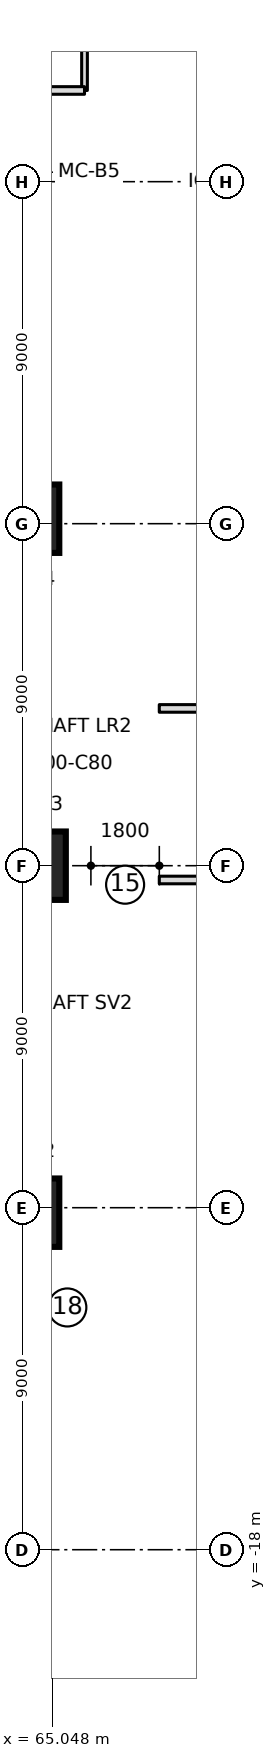
"""IFC4 building model, lengths in metres.
Left out: names, types, materials, properties, quantities, classifications, styles, units other than length and angle.
Written with IfcOpenShell. Run it as: python <this file> out.ifc"""

import sys

from ifc_helpers import new_model, si_unit, direction, frame, frame_2d, origin, origin_2d, place, context, subcontext, project, spatial, rectangle, extrude, element, save


model = new_model("IFC4")
c1 = context("Model", 3, precision=1e-05, world=origin(), true_north=direction((0.0, 1.0)))
c2 = subcontext(c1, "Body", "Model", "MODEL_VIEW")
j1 = project(units=[si_unit("LENGTHUNIT", "METRE"), si_unit("PLANEANGLEUNIT", "RADIAN")], contexts=[c1])
p1 = place(None, origin())
s1 = spatial("IfcSite", under=j1, at=p1, CompositionType="ELEMENT")
p2 = place(p1, origin())
s2 = spatial("IfcBuilding", under=s1, at=p2, CompositionType="ELEMENT")
p3 = place(p2, frame((0.0, 0.0, 8.0)))
s3 = spatial("IfcBuildingStorey", under=s2, at=p3, CompositionType="ELEMENT", Elevation=8.0)
for number, where, z_axis, x_axis in (
    (1, (64.328, -9.131, 0.0), (0.0, 0.0, 1.0), (1.0, 0.0, 0.0)),
    (2, (64.5, 0.0, 0.0), (0.0, 0.0, 1.0), (1.0, 0.0, 0.0)),
    (3, (64.328, 9.131, 0.0), (0.0, 0.0, 1.0), (1.0, 0.0, 0.0)),
):
    element("IfcColumn", number, at=place(p3, frame(where, z_axis=z_axis, x_axis=x_axis)), inside=s3, PredefinedType="COLUMN", context=c2, shape_type="SweptSolid", body=[
        extrude(rectangle(XDim=1.8, YDim=1.8, at=origin_2d()), origin(), (0.0, 0.0, 1.0), 5.5),
    ])
p4 = place(p3, frame((67.859, -0.376, 0.0), z_axis=(0.0, 0.0, 1.0), x_axis=(1.0, 0.0, 0.0)))
e4 = element("IfcWall", 4, at=p4, inside=s3, PredefinedType="PARTITIONING", context=c2, shape_type="SweptSolid", body=[
    extrude(rectangle(XDim=6.711, YDim=0.2, at=frame_2d((3.355, 0.0))), origin(), (0.0, 0.0, 1.0), 5.15),
])
p5 = place(p4, frame((2.47, 0.0, 0.0)))
e5 = element("IfcOpeningElement", 5, at=p5, cuts=e4, PredefinedType="OPENING", context=c2, shape_type="SweptSolid", body=[
    extrude(rectangle(XDim=1.0, YDim=2.1, at=frame_2d((0.5, 1.05))), frame((0.0, 0.11, 0.0), z_axis=(0.0, -1.0, 0.0), x_axis=(1.0, 0.0, 0.0)), (0.0, 0.0, 1.0), 0.22),
])
p6 = place(p3, frame((65.892, 20.4, 0.0), z_axis=(0.0, 0.0, 1.0), x_axis=(0.0, 1.0, 0.0)))
e6 = element("IfcWall", 6, at=p6, inside=s3, PredefinedType="PARTITIONING", context=c2, shape_type="SweptSolid", body=[
    extrude(rectangle(XDim=16.17, YDim=0.15, at=frame_2d((8.085, 0.0))), origin(), (0.0, 0.0, 1.0), 5.15),
])
p7 = place(p3, frame((67.859, 4.139, 0.0), z_axis=(0.0, 0.0, 1.0), x_axis=(1.0, 0.0, 0.0)))
e7 = element("IfcWall", 7, at=p7, inside=s3, PredefinedType="PARTITIONING", context=c2, shape_type="SweptSolid", body=[
    extrude(rectangle(XDim=4.772, YDim=0.2, at=frame_2d((2.386, 0.0))), origin(), (0.0, 0.0, 1.0), 5.15),
])
p8 = place(p7, frame((1.886, 0.0, 0.0)))
e8 = element("IfcOpeningElement", 8, at=p8, cuts=e7, PredefinedType="OPENING", context=c2, shape_type="SweptSolid", body=[
    extrude(rectangle(XDim=1.2, YDim=2.1, at=frame_2d((0.6, 1.05))), frame((0.0, 0.11, 0.0), z_axis=(0.0, -1.0, 0.0), x_axis=(1.0, 0.0, 0.0)), (0.0, 0.0, 1.0), 0.22),
])
p9 = place(p3, frame((65.892, 20.4, 0.0), z_axis=(0.0, 0.0, 1.0), x_axis=(-1.0, 0.0, 0.0)))
e9 = element("IfcWall", 9, at=p9, inside=s3, PredefinedType="PARTITIONING", context=c2, shape_type="SweptSolid", body=[
    extrude(rectangle(XDim=7.351, YDim=0.2, at=frame_2d((3.676, 0.0))), origin(), (0.0, 0.0, 1.0), 5.15),
])
p10 = place(p9, frame((3.176, 0.0, 0.0)))
e10 = element("IfcOpeningElement", 10, at=p10, cuts=e9, PredefinedType="OPENING", context=c2, shape_type="SweptSolid", body=[
    extrude(rectangle(XDim=1.0, YDim=2.1, at=frame_2d((0.5, 1.05))), frame((0.0, 0.11, 0.0), z_axis=(0.0, -1.0, 0.0), x_axis=(1.0, 0.0, 0.0)), (0.0, 0.0, 1.0), 0.22),
])
save(model, sys.argv[1])
